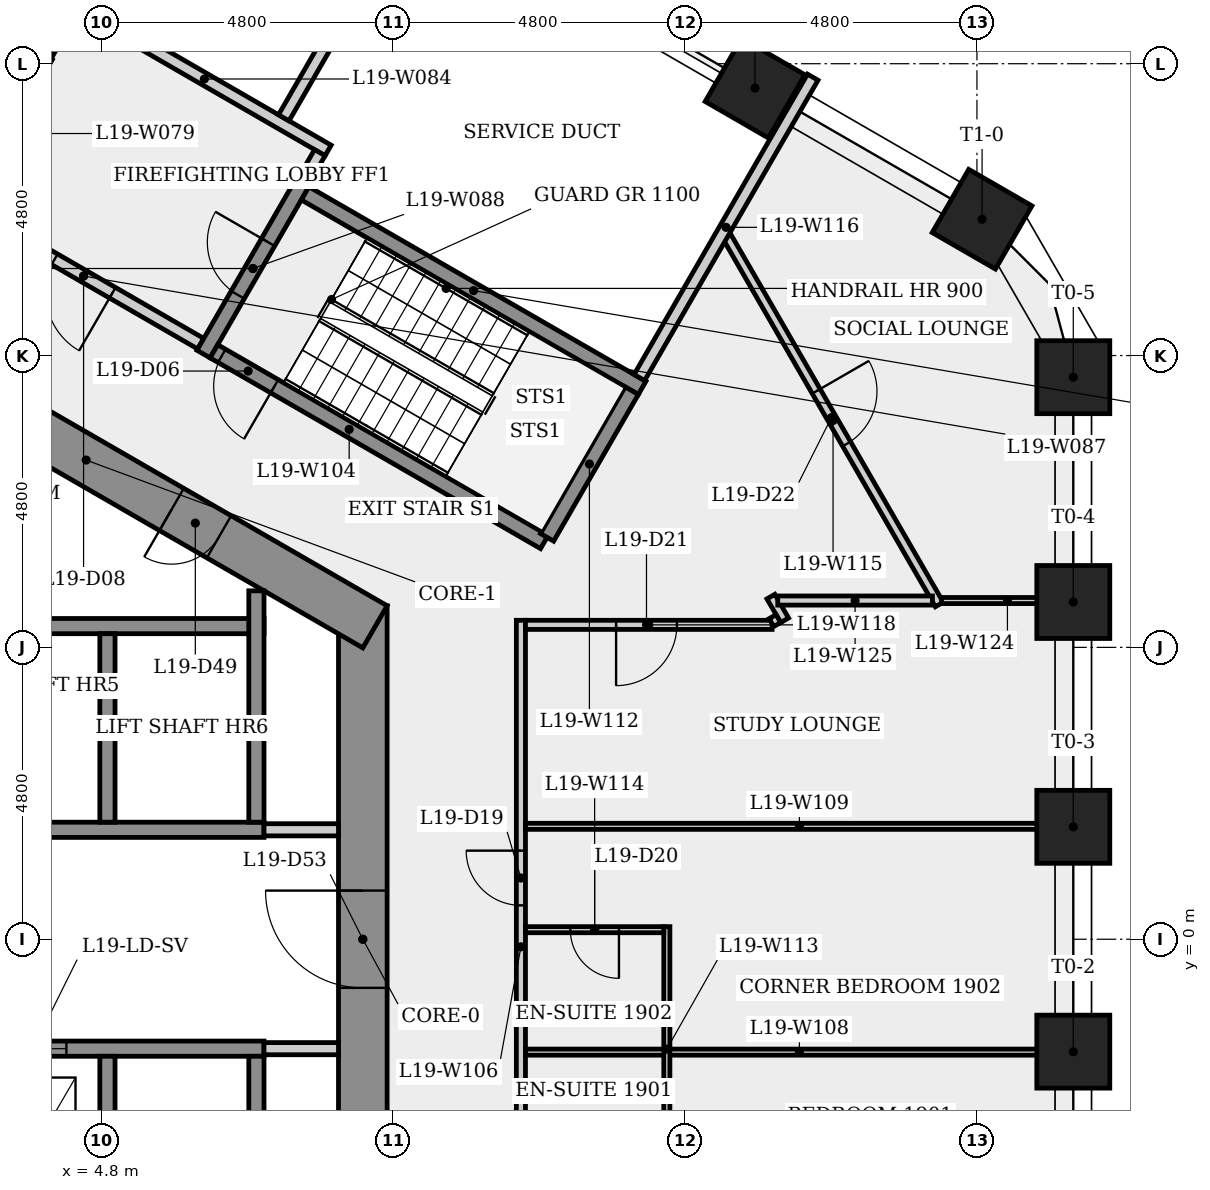
"""IFC4 building model, lengths in metres.
Left out: names, types, materials, properties, quantities, classifications, styles, units other than length and angle.
Written with IfcOpenShell. Run it as: python <this file> out.ifc"""

import sys

from ifc_helpers import new_model, si_unit, direction, frame, frame_2d, origin, origin_2d, place, context, subcontext, project, spatial, rectangle, extrude, element, fill, save


model = new_model("IFC4")
c1 = context("Model", 3, precision=1e-05, world=origin(), true_north=direction((0.0, 1.0)))
c2 = subcontext(c1, "Body", "Model", "MODEL_VIEW")
j1 = project(units=[si_unit("LENGTHUNIT", "METRE"), si_unit("PLANEANGLEUNIT", "RADIAN")], contexts=[c1])
p1 = place(None, origin())
s1 = spatial("IfcSite", under=j1, at=p1, CompositionType="ELEMENT")
p2 = place(p1, origin())
s2 = spatial("IfcBuilding", under=s1, at=p2, CompositionType="ELEMENT")
p3 = place(p2, frame((0.0, 0.0, 74.3)))
s3 = spatial("IfcBuildingStorey", under=s2, at=p3, CompositionType="ELEMENT", Elevation=74.3)
p4 = place(p3, frame((9.1, -5.485, 0.0), z_axis=(0.0, 0.0, 1.0), x_axis=(0.0, 1.0, 0.0)))
e1 = element("IfcWall", 1, at=p4, inside=s3, PredefinedType="SHEAR", context=c2, shape_type="SweptSolid", body=[
    extrude(rectangle(XDim=10.97, YDim=0.8, at=frame_2d((5.485, 0.0))), origin(), (0.0, 0.0, 1.0), 4.0),
])
p5 = place(p4, frame((4.685, 0.0, 0.0)))
e2 = element("IfcOpeningElement", 2, at=p5, cuts=e1, PredefinedType="OPENING", context=c2, shape_type="SweptSolid", body=[
    extrude(rectangle(XDim=1.6, YDim=2.1, at=frame_2d((0.8, 1.05))), frame((0.0, 0.41, 0.0), z_axis=(0.0, -1.0, 0.0), x_axis=(1.0, 0.0, 0.0)), (0.0, 0.0, 1.0), 0.82),
])
p6 = place(p3, frame((9.3, 5.138, 0.0), z_axis=(0.0, 0.0, 1.0), x_axis=(-0.866023993627, 0.500002442456, 0.0)))
e3 = element("IfcWall", 3, at=p6, inside=s3, PredefinedType="SHEAR", context=c2, shape_type="SweptSolid", body=[
    extrude(rectangle(XDim=10.97, YDim=0.8, at=frame_2d((5.485, 0.0))), origin(), (0.0, 0.0, 1.0), 4.0),
])
p7 = place(p6, frame((2.962, 0.0, 0.0)))
e4 = element("IfcOpeningElement", 4, at=p7, cuts=e3, PredefinedType="OPENING", context=c2, shape_type="SweptSolid", body=[
    extrude(rectangle(XDim=0.9, YDim=2.1, at=frame_2d((0.45, 1.05))), frame((0.0, 0.41, 0.0), z_axis=(0.0, -1.0, 0.0), x_axis=(1.0, 0.0, 0.0)), (0.0, 0.0, 1.0), 0.82),
])
for number, where, z_axis, x_axis in (
    (5, (20.785, -1.849, 0.0), (0.0, 0.0, 1.0), (1.0, 0.0, 0.0)),
    (6, (20.785, 1.849, 0.0), (0.0, 0.0, 1.0), (1.0, 0.0, 0.0)),
    (7, (20.785, 5.546, 0.0), (0.0, 0.0, 1.0), (1.0, 0.0, 0.0)),
    (8, (20.785, 9.244, 0.0), (0.0, 0.0, 1.0), (1.0, 0.0, 0.0)),
    (9, (19.285, 11.842, 0.0), (0.0, 0.0, 1.0), (0.5, 0.866, 0.0)),
    (10, (15.55, 13.998, 0.0), (0.0, 0.0, 1.0), (0.5, 0.866, 0.0)),
):
    element("IfcColumn", number, at=place(p3, frame(where, z_axis=z_axis, x_axis=x_axis)), inside=s3, PredefinedType="COLUMN", context=c2, shape_type="SweptSolid", body=[
        extrude(rectangle(XDim=1.2, YDim=1.2, at=origin_2d()), origin(), (0.0, 0.0, 1.0), 4.0),
    ])
p8 = place(p3, frame((-7.475, 1.8, 0.0), z_axis=(0.0, 0.0, 1.0), x_axis=(1.0, 0.0, 0.0)))
e11 = element("IfcWall", 11, at=p8, inside=s3, PredefinedType="SHEAR", context=c2, shape_type="SweptSolid", body=[
    extrude(rectangle(XDim=14.95, YDim=0.25, at=frame_2d((7.475, 0.0))), origin(), (0.0, 0.0, 1.0), 3.6),
])
p9 = place(p3, frame((-7.225, 5.15, 0.0), z_axis=(0.0, 0.0, 1.0), x_axis=(1.0, 0.0, 0.0)))
e12 = element("IfcWall", 12, at=p9, inside=s3, PredefinedType="SHEAR", context=c2, shape_type="SweptSolid", body=[
    extrude(rectangle(XDim=14.7, YDim=0.25, at=frame_2d((7.35, 0.0))), origin(), (0.0, 0.0, 1.0), 3.6),
])
p10 = place(p3, frame((-7.225, -1.8, 0.0), z_axis=(0.0, 0.0, 1.0), x_axis=(1.0, 0.0, 0.0)))
e13 = element("IfcWall", 13, at=p10, inside=s3, PredefinedType="SHEAR", context=c2, shape_type="SweptSolid", body=[
    extrude(rectangle(XDim=14.7, YDim=0.25, at=frame_2d((7.35, 0.0))), origin(), (0.0, 0.0, 1.0), 3.6),
])
p11 = place(p10, frame((0.597, 0.0, 0.0)))
e14 = element("IfcOpeningElement", 14, at=p11, cuts=e13, PredefinedType="OPENING", context=c2, shape_type="SweptSolid", body=[
    extrude(rectangle(XDim=1.1, YDim=2.1, at=frame_2d((0.55, 1.05))), frame((0.0, 0.135, 0.0), z_axis=(0.0, -1.0, 0.0), x_axis=(1.0, 0.0, 0.0)), (0.0, 0.0, 1.0), 0.27),
])
p12 = place(p10, frame((3.0, 0.0, 0.0)))
e15 = element("IfcOpeningElement", 15, at=p12, cuts=e13, PredefinedType="OPENING", context=c2, shape_type="SweptSolid", body=[
    extrude(rectangle(XDim=1.1, YDim=2.1, at=frame_2d((0.55, 1.05))), frame((0.0, 0.135, 0.0), z_axis=(0.0, -1.0, 0.0), x_axis=(1.0, 0.0, 0.0)), (0.0, 0.0, 1.0), 0.27),
])
p13 = place(p10, frame((5.45, 0.0, 0.0)))
e16 = element("IfcOpeningElement", 16, at=p13, cuts=e13, PredefinedType="OPENING", context=c2, shape_type="SweptSolid", body=[
    extrude(rectangle(XDim=1.1, YDim=2.1, at=frame_2d((0.55, 1.05))), frame((0.0, 0.135, 0.0), z_axis=(0.0, -1.0, 0.0), x_axis=(1.0, 0.0, 0.0)), (0.0, 0.0, 1.0), 0.27),
])
p14 = place(p10, frame((7.9, 0.0, 0.0)))
e17 = element("IfcOpeningElement", 17, at=p14, cuts=e13, PredefinedType="OPENING", context=c2, shape_type="SweptSolid", body=[
    extrude(rectangle(XDim=1.1, YDim=2.1, at=frame_2d((0.55, 1.05))), frame((0.0, 0.135, 0.0), z_axis=(0.0, -1.0, 0.0), x_axis=(1.0, 0.0, 0.0)), (0.0, 0.0, 1.0), 0.27),
])
p15 = place(p10, frame((10.35, 0.0, 0.0)))
e18 = element("IfcOpeningElement", 18, at=p15, cuts=e13, PredefinedType="OPENING", context=c2, shape_type="SweptSolid", body=[
    extrude(rectangle(XDim=1.1, YDim=2.1, at=frame_2d((0.55, 1.05))), frame((0.0, 0.135, 0.0), z_axis=(0.0, -1.0, 0.0), x_axis=(1.0, 0.0, 0.0)), (0.0, 0.0, 1.0), 0.27),
])
p16 = place(p3, frame((3.885, 14.529, 0.0), z_axis=(0.0, 0.0, 1.0), x_axis=(0.499997628298, 0.866026773083, 0.0)))
e19 = element("IfcWall", 19, at=p16, inside=s3, PredefinedType="PLUMBINGWALL", context=c2, shape_type="SweptSolid", body=[
    extrude(rectangle(XDim=1.075, YDim=0.2, at=frame_2d((0.538, 0.0))), origin(), (0.0, 0.0, 1.0), 3.6),
])
p17 = place(p3, frame((4.459, 15.323, 0.0), z_axis=(0.0, 0.0, 1.0), x_axis=(0.866016039709, -0.500016218704, 0.0)))
e20 = element("IfcWall", 20, at=p17, inside=s3, PredefinedType="PLUMBINGWALL", context=c2, shape_type="SweptSolid", body=[
    extrude(rectangle(XDim=4.7, YDim=0.2, at=frame_2d((2.35, 0.0))), origin(), (0.0, 0.0, 1.0), 3.6),
])
for number, where, z_axis, x_axis in (
    (21, (4.9, -1.925, 0.0), (0.0, 0.0, 1.0), (0.0, -1.0, 0.0)),
    (22, (4.9, 5.025, 0.0), (0.0, 0.0, 1.0), (0.0, -1.0, 0.0)),
):
    element("IfcWall", number, at=place(p3, frame(where, z_axis=z_axis, x_axis=x_axis)), inside=s3, PredefinedType="SHEAR", context=c2, shape_type="SweptSolid", body=[
        extrude(rectangle(XDim=3.1, YDim=0.25, at=frame_2d((1.55, 0.0))), origin(), (0.0, 0.0, 1.0), 4.0),
    ])
p18 = place(p3, frame((6.435, 9.795, 0.0), z_axis=(0.0, 0.0, 1.0), x_axis=(-0.866012907634, 0.500021643343, 0.0)))
e23 = element("IfcWall", 23, at=p18, inside=s3, PredefinedType="PARTITIONING", context=c2, shape_type="SweptSolid", body=[
    extrude(rectangle(XDim=4.45, YDim=0.2, at=frame_2d((2.225, 0.0))), origin(), (0.0, 0.0, 1.0), 3.6),
])
p19 = place(p18, frame((1.675, 0.0, 0.0)))
e24 = element("IfcOpeningElement", 24, at=p19, cuts=e23, PredefinedType="OPENING", context=c2, shape_type="SweptSolid", body=[
    extrude(rectangle(XDim=1.1, YDim=2.1, at=frame_2d((0.55, 1.05))), frame((0.0, 0.11, 0.0), z_axis=(0.0, -1.0, 0.0), x_axis=(1.0, 0.0, 0.0)), (0.0, 0.0, 1.0), 0.22),
])
p20 = place(p3, frame((6.48, 9.624, 0.0), z_axis=(0.0, 0.0, 1.0), x_axis=(0.500017246033, 0.866015446554, 0.0)))
e25 = element("IfcWall", 25, at=p20, inside=s3, PredefinedType="SHEAR", context=c2, shape_type="SweptSolid", body=[
    extrude(rectangle(XDim=3.25, YDim=0.25, at=frame_2d((1.625, 0.0))), origin(), (0.0, 0.0, 1.0), 3.6),
])
p21 = place(p20, frame((1.125, 0.0, 0.0)))
e26 = element("IfcOpeningElement", 26, at=p21, cuts=e25, PredefinedType="OPENING", context=c2, shape_type="SweptSolid", body=[
    extrude(rectangle(XDim=1.0, YDim=2.1, at=frame_2d((0.5, 1.05))), frame((0.0, 0.135, 0.0), z_axis=(0.0, -1.0, 0.0), x_axis=(1.0, 0.0, 0.0)), (0.0, 0.0, 1.0), 0.27),
])
p22 = place(p3, frame((7.475, 1.8, 0.0), z_axis=(0.0, 0.0, 1.0), x_axis=(1.0, 0.0, 0.0)))
e27 = element("IfcWall", 27, at=p22, inside=s3, PredefinedType="PARTITIONING", context=c2, shape_type="SweptSolid", body=[
    extrude(rectangle(XDim=1.225, YDim=0.2, at=frame_2d((0.613, 0.0))), origin(), (0.0, 0.0, 1.0), 3.6),
])
for number, where, z_axis, x_axis in (
    (28, (7.35, -1.925, 0.0), (0.0, 0.0, 1.0), (0.0, -1.0, 0.0)),
    (29, (7.35, 5.73, 0.0), (0.0, 0.0, 1.0), (0.0, -1.0, 0.0)),
):
    element("IfcWall", number, at=place(p3, frame(where, z_axis=z_axis, x_axis=x_axis)), inside=s3, PredefinedType="SHEAR", context=c2, shape_type="SweptSolid", body=[
        extrude(rectangle(XDim=3.805, YDim=0.25, at=frame_2d((1.903, 0.0))), origin(), (0.0, 0.0, 1.0), 3.6),
    ])
p23 = place(p3, frame((7.8, 13.51, 0.0), z_axis=(0.0, 0.0, 1.0), x_axis=(0.49998543329, 0.866033813715, 0.0)))
e30 = element("IfcWall", 30, at=p23, inside=s3, PredefinedType="PLUMBINGWALL", context=c2, shape_type="SweptSolid", body=[
    extrude(rectangle(XDim=4.929, YDim=0.2, at=frame_2d((2.464, 0.0))), origin(), (0.0, 0.0, 1.0), 3.6),
])
p24 = place(p3, frame((8.151, 12.268, 0.0), z_axis=(0.0, 0.0, 1.0), x_axis=(0.866025499775, -0.499999833739, 0.0)))
e31 = element("IfcWall", 31, at=p24, inside=s3, PredefinedType="SHEAR", context=c2, shape_type="SweptSolid", body=[
    extrude(rectangle(XDim=6.4, YDim=0.25, at=frame_2d((3.2, 0.0))), origin(), (0.0, 0.0, 1.0), 3.6),
])
p25 = place(p3, frame((8.393, 12.937, 0.0), z_axis=(0.0, 0.0, 1.0), x_axis=(-0.500065409566, -0.86598763626, 0.0)))
e32 = element("IfcWall", 32, at=p25, inside=s3, PredefinedType="PLUMBINGWALL", context=c2, shape_type="SweptSolid", body=[
    extrude(rectangle(XDim=0.575, YDim=0.2, at=frame_2d((0.288, 0.0))), origin(), (0.0, 0.0, 1.0), 3.6),
])
p26 = place(p3, frame((8.7, -1.8, 0.0), z_axis=(0.0, 0.0, 1.0), x_axis=(-1.0, 0.0, 0.0)))
e33 = element("IfcWall", 33, at=p26, inside=s3, PredefinedType="PARTITIONING", context=c2, shape_type="SweptSolid", body=[
    extrude(rectangle(XDim=1.225, YDim=0.2, at=frame_2d((0.613, 0.0))), origin(), (0.0, 0.0, 1.0), 3.6),
])
p27 = place(p3, frame((11.1, 7.101, 0.0), z_axis=(0.0, 0.0, 1.0), x_axis=(-0.8660265141, 0.499998076872, 0.0)))
e34 = element("IfcWall", 34, at=p27, inside=s3, PredefinedType="SHEAR", context=c2, shape_type="SweptSolid", body=[
    extrude(rectangle(XDim=5.137, YDim=0.25, at=frame_2d((2.569, 0.0))), origin(), (0.0, 0.0, 1.0), 3.6),
])
p28 = place(p27, frame((3.987, 0.0, 0.0)))
e35 = element("IfcOpeningElement", 35, at=p28, cuts=e34, PredefinedType="OPENING", context=c2, shape_type="SweptSolid", body=[
    extrude(rectangle(XDim=1.0, YDim=2.1, at=frame_2d((0.5, 1.05))), frame((0.0, 0.135, 0.0), z_axis=(0.0, -1.0, 0.0), x_axis=(1.0, 0.0, 0.0)), (0.0, 0.0, 1.0), 0.27),
])
p29 = place(p3, frame((11.7, -5.496, 0.0), z_axis=(0.0, 0.0, 1.0), x_axis=(0.0, 1.0, 0.0)))
e36 = element("IfcWall", 36, at=p29, inside=s3, PredefinedType="PARTITIONING", context=c2, shape_type="SweptSolid", body=[
    extrude(rectangle(XDim=10.741, YDim=0.15, at=frame_2d((5.371, 0.0))), origin(), (0.0, 0.0, 1.0), 3.6),
])
p30 = place(p29, frame((6.052, 0.0, 0.0)))
e37 = element("IfcOpeningElement", 37, at=p30, cuts=e36, PredefinedType="OPENING", context=c2, shape_type="SweptSolid", body=[
    extrude(rectangle(XDim=0.9, YDim=2.1, at=frame_2d((0.45, 1.05))), frame((0.0, 0.085, 0.0), z_axis=(0.0, -1.0, 0.0), x_axis=(1.0, 0.0, 0.0)), (0.0, 0.0, 1.0), 0.17),
])
for number, where, z_axis, x_axis in (
    (38, (11.775, -1.857, 0.0), (0.0, 0.0, 1.0), (1.0, 0.0, 0.0)),
    (39, (11.775, 1.857, 0.0), (0.0, 0.0, 1.0), (1.0, 0.0, 0.0)),
):
    element("IfcWall", number, at=place(p3, frame(where, z_axis=z_axis, x_axis=x_axis)), inside=s3, PredefinedType="PARTITIONING", context=c2, shape_type="SweptSolid", body=[
        extrude(rectangle(XDim=9.01, YDim=0.1, at=frame_2d((4.505, 0.0))), origin(), (0.0, 0.0, 1.0), 3.6),
    ])
p31 = place(p3, frame((12.085, 6.532, 0.0), z_axis=(0.0, 0.0, 1.0), x_axis=(-0.86604373436, 0.499968249168, 0.0)))
e40 = element("IfcWall", 40, at=p31, inside=s3, PredefinedType="SHEAR", context=c2, shape_type="SweptSolid", body=[
    extrude(rectangle(XDim=1.118, YDim=0.25, at=frame_2d((0.559, 0.0))), origin(), (0.0, 0.0, 1.0), 3.6),
])
p32 = place(p3, frame((13.523, 9.022, 0.0), z_axis=(0.0, 0.0, 1.0), x_axis=(-0.500013277472, -0.866017737897, 0.0)))
e41 = element("IfcWall", 41, at=p32, inside=s3, PredefinedType="SHEAR", context=c2, shape_type="SweptSolid", body=[
    extrude(rectangle(XDim=2.786, YDim=0.25, at=frame_2d((1.393, 0.0))), origin(), (0.0, 0.0, 1.0), 3.6),
])
p33 = place(p3, frame((14.1, -3.821, 0.0), z_axis=(0.0, 0.0, 1.0), x_axis=(0.0, 1.0, 0.0)))
e42 = element("IfcWall", 42, at=p33, inside=s3, PredefinedType="PARTITIONING", context=c2, shape_type="SweptSolid", body=[
    extrude(rectangle(XDim=4.027, YDim=0.1, at=frame_2d((2.014, 0.0))), origin(), (0.0, 0.0, 1.0), 3.6),
])
p34 = place(p3, frame((14.05, 0.157, 0.0), z_axis=(0.0, 0.0, 1.0), x_axis=(-1.0, 0.0, 0.0)))
e43 = element("IfcWall", 43, at=p34, inside=s3, PredefinedType="PARTITIONING", context=c2, shape_type="SweptSolid", body=[
    extrude(rectangle(XDim=2.275, YDim=0.1, at=frame_2d((1.138, 0.0))), origin(), (0.0, 0.0, 1.0), 3.6),
])
p35 = place(p34, frame((0.738, 0.0, 0.0)))
e44 = element("IfcOpeningElement", 44, at=p35, cuts=e43, PredefinedType="OPENING", context=c2, shape_type="SweptSolid", body=[
    extrude(rectangle(XDim=0.8, YDim=2.1, at=frame_2d((0.4, 1.05))), frame((0.0, 0.06, 0.0), z_axis=(0.0, -1.0, 0.0), x_axis=(1.0, 0.0, 0.0)), (0.0, 0.0, 1.0), 0.12),
])
p36 = place(p3, frame((15.087, 11.558, 0.0), z_axis=(0.0, 0.0, 1.0), x_axis=(0.499975479054, -0.866039560496, 0.0)))
e45 = element("IfcWall", 45, at=p36, inside=s3, PredefinedType="PARTITIONING", context=c2, shape_type="SweptSolid", body=[
    extrude(rectangle(XDim=6.988, YDim=0.15, at=frame_2d((3.494, 0.0))), origin(), (0.0, 0.0, 1.0), 3.6),
])
p37 = place(p36, frame((2.939, 0.0, 0.0)))
e46 = element("IfcOpeningElement", 46, at=p37, cuts=e45, PredefinedType="OPENING", context=c2, shape_type="SweptSolid", body=[
    extrude(rectangle(XDim=1.0, YDim=2.1, at=frame_2d((0.5, 1.05))), frame((0.0, 0.085, 0.0), z_axis=(0.0, -1.0, 0.0), x_axis=(1.0, 0.0, 0.0)), (0.0, 0.0, 1.0), 0.17),
])
p38 = place(p3, frame((13.648, 9.239, 0.0), z_axis=(0.0, 0.0, 1.0), x_axis=(0.499983049987, 0.866035189658, 0.0)))
e47 = element("IfcWall", 47, at=p38, inside=s3, PredefinedType="PLUMBINGWALL", context=c2, shape_type="SweptSolid", body=[
    extrude(rectangle(XDim=5.704, YDim=0.2, at=frame_2d((2.852, 0.0))), origin(), (0.0, 0.0, 1.0), 3.6),
])
p39 = place(p3, frame((15.831, 5.171, 0.0), z_axis=(0.0, 0.0, 1.0), x_axis=(-1.0, 0.0, 0.0)))
e48 = element("IfcWall", 48, at=p39, inside=s3, PredefinedType="PARTITIONING", context=c2, shape_type="SweptSolid", body=[
    extrude(rectangle(XDim=4.056, YDim=0.15, at=frame_2d((2.028, 0.0))), origin(), (0.0, 0.0, 1.0), 3.6),
])
p40 = place(p39, frame((1.565, 0.0, 0.0)))
e49 = element("IfcOpeningElement", 49, at=p40, cuts=e48, PredefinedType="OPENING", context=c2, shape_type="SweptSolid", body=[
    extrude(rectangle(XDim=1.0, YDim=2.1, at=frame_2d((0.5, 1.05))), frame((0.0, 0.085, 0.0), z_axis=(0.0, -1.0, 0.0), x_axis=(1.0, 0.0, 0.0)), (0.0, 0.0, 1.0), 0.17),
])
p41 = place(p3, frame((15.812, 5.635, 0.0), z_axis=(0.0, 0.0, 1.0), x_axis=(0.500051437896, -0.865995704065, 0.0)))
e50 = element("IfcWall", 50, at=p41, inside=s3, PredefinedType="PARTITIONING", context=c2, shape_type="SweptSolid", body=[
    extrude(rectangle(XDim=0.45, YDim=0.15, at=frame_2d((0.225, 0.0))), origin(), (0.0, 0.0, 1.0), 3.6),
])
p42 = place(p3, frame((15.934, 5.273, 0.0), z_axis=(0.0, 0.0, 1.0), x_axis=(-0.865936922628, -0.500153222552, 0.0)))
e51 = element("IfcWall", 51, at=p42, inside=s3, PredefinedType="PARTITIONING", context=c2, shape_type="SweptSolid", body=[
    extrude(rectangle(XDim=0.131, YDim=0.15, at=frame_2d((0.065, 0.0))), origin(), (0.0, 0.0, 1.0), 3.6),
])
p43 = place(p3, frame((18.618, 5.571, 0.0), z_axis=(0.0, 0.0, 1.0), x_axis=(1.0, 0.0, 0.0)))
e52 = element("IfcWall", 52, at=p43, inside=s3, PredefinedType="PARTITIONING", context=c2, shape_type="SweptSolid", body=[
    extrude(rectangle(XDim=2.167, YDim=0.1, at=frame_2d((1.083, 0.0))), origin(), (0.0, 0.0, 1.0), 3.6),
])
p44 = place(p3, frame((18.468, 5.571, 0.0), z_axis=(0.0, 0.0, 1.0), x_axis=(-1.0, 0.0, 0.0)))
e53 = element("IfcWall", 53, at=p44, inside=s3, PredefinedType="PARTITIONING", context=c2, shape_type="SweptSolid", body=[
    extrude(rectangle(XDim=2.544, YDim=0.15, at=frame_2d((1.272, 0.0))), origin(), (0.0, 0.0, 1.0), 3.6),
])
p45 = place(p15, origin())
e54 = element("IfcDoor", 54, at=p45, inside=s3, OperationType="SLIDING_TO_LEFT", PredefinedType="DOOR", context=c2, shape_type="SweptSolid", body=[
    extrude(rectangle(XDim=1.1, YDim=2.1, at=frame_2d((0.55, 1.05))), frame((0.0, 0.025, 0.0), z_axis=(0.0, -1.0, 0.0), x_axis=(1.0, 0.0, 0.0)), (0.0, 0.0, 1.0), 0.05),
])
fill(e18, e54)
p46 = place(p28, origin())
e55 = element("IfcDoor", 55, at=p46, inside=s3, OperationType="SINGLE_SWING_LEFT", PredefinedType="DOOR", context=c2, shape_type="SweptSolid", body=[
    extrude(rectangle(XDim=1.0, YDim=2.1, at=frame_2d((0.5, 1.05))), frame((0.0, 0.025, 0.0), z_axis=(0.0, -1.0, 0.0), x_axis=(1.0, 0.0, 0.0)), (0.0, 0.0, 1.0), 0.05),
])
fill(e35, e55)
p47 = place(p21, origin())
e56 = element("IfcDoor", 56, at=p47, inside=s3, OperationType="SINGLE_SWING_RIGHT", PredefinedType="DOOR", context=c2, shape_type="SweptSolid", body=[
    extrude(rectangle(XDim=1.0, YDim=2.1, at=frame_2d((0.5, 1.05))), frame((0.0, 0.025, 0.0), z_axis=(0.0, -1.0, 0.0), x_axis=(1.0, 0.0, 0.0)), (0.0, 0.0, 1.0), 0.05),
])
fill(e26, e56)
p48 = place(p19, origin())
e57 = element("IfcDoor", 57, at=p48, inside=s3, OperationType="SINGLE_SWING_LEFT", PredefinedType="DOOR", context=c2, shape_type="SweptSolid", body=[
    extrude(rectangle(XDim=1.1, YDim=2.1, at=frame_2d((0.55, 1.05))), frame((0.0, 0.025, 0.0), z_axis=(0.0, -1.0, 0.0), x_axis=(1.0, 0.0, 0.0)), (0.0, 0.0, 1.0), 0.05),
])
fill(e24, e57)
p49 = place(p30, origin())
e58 = element("IfcDoor", 58, at=p49, inside=s3, OperationType="SINGLE_SWING_RIGHT", PredefinedType="DOOR", context=c2, shape_type="SweptSolid", body=[
    extrude(rectangle(XDim=0.9, YDim=2.1, at=frame_2d((0.45, 1.05))), frame((0.0, 0.025, 0.0), z_axis=(0.0, -1.0, 0.0), x_axis=(1.0, 0.0, 0.0)), (0.0, 0.0, 1.0), 0.05),
])
fill(e37, e58)
p50 = place(p35, origin())
e59 = element("IfcDoor", 59, at=p50, inside=s3, OperationType="SINGLE_SWING_LEFT", PredefinedType="DOOR", context=c2, shape_type="SweptSolid", body=[
    extrude(rectangle(XDim=0.8, YDim=2.1, at=frame_2d((0.4, 1.05))), frame((0.0, 0.025, 0.0), z_axis=(0.0, -1.0, 0.0), x_axis=(1.0, 0.0, 0.0)), (0.0, 0.0, 1.0), 0.05),
])
fill(e44, e59)
p51 = place(p40, origin())
e60 = element("IfcDoor", 60, at=p51, inside=s3, OperationType="SINGLE_SWING_RIGHT", PredefinedType="DOOR", context=c2, shape_type="SweptSolid", body=[
    extrude(rectangle(XDim=1.0, YDim=2.1, at=frame_2d((0.5, 1.05))), frame((0.0, 0.025, 0.0), z_axis=(0.0, -1.0, 0.0), x_axis=(1.0, 0.0, 0.0)), (0.0, 0.0, 1.0), 0.05),
])
fill(e49, e60)
p52 = place(p37, origin())
e61 = element("IfcDoor", 61, at=p52, inside=s3, OperationType="SINGLE_SWING_LEFT", PredefinedType="DOOR", context=c2, shape_type="SweptSolid", body=[
    extrude(rectangle(XDim=1.0, YDim=2.1, at=frame_2d((0.5, 1.05))), frame((0.0, 0.025, 0.0), z_axis=(0.0, -1.0, 0.0), x_axis=(1.0, 0.0, 0.0)), (0.0, 0.0, 1.0), 0.05),
])
fill(e46, e61)
p53 = place(p7, origin())
e62 = element("IfcDoor", 62, at=p53, inside=s3, OperationType="SINGLE_SWING_RIGHT", PredefinedType="DOOR", context=c2, shape_type="SweptSolid", body=[
    extrude(rectangle(XDim=0.9, YDim=2.1, at=frame_2d((0.45, 1.05))), frame((0.0, 0.025, 0.0), z_axis=(0.0, -1.0, 0.0), x_axis=(1.0, 0.0, 0.0)), (0.0, 0.0, 1.0), 0.05),
])
fill(e4, e62)
p54 = place(p5, origin())
e63 = element("IfcDoor", 63, at=p54, inside=s3, OperationType="SINGLE_SWING_RIGHT", PredefinedType="DOOR", context=c2, shape_type="SweptSolid", body=[
    extrude(rectangle(XDim=1.6, YDim=2.1, at=frame_2d((0.8, 1.05))), frame((0.0, 0.025, 0.0), z_axis=(0.0, -1.0, 0.0), x_axis=(1.0, 0.0, 0.0)), (0.0, 0.0, 1.0), 0.05),
])
fill(e2, e63)
save(model, sys.argv[1])
